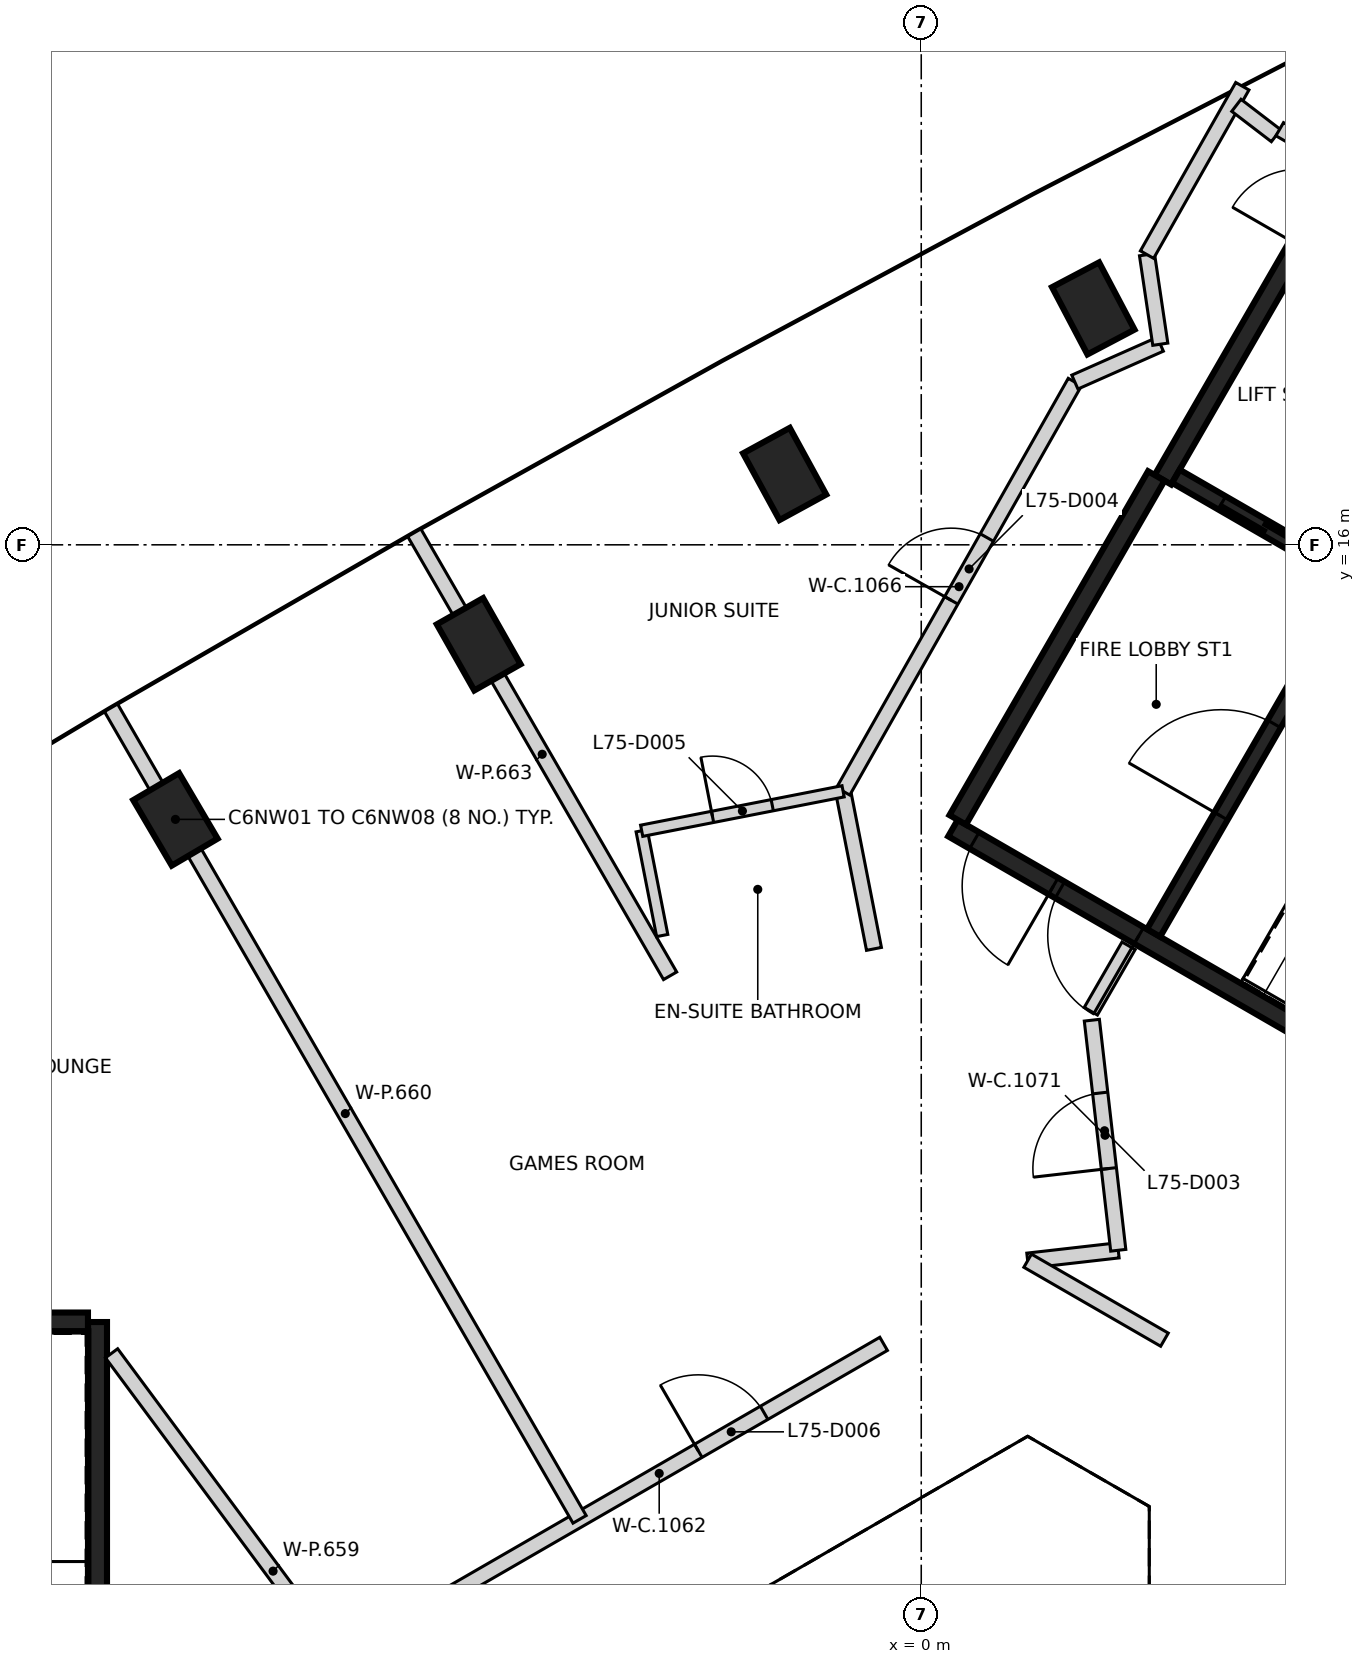
"""IFC4 building model, lengths in metres.
Left out: names, types, materials, properties, quantities, classifications, styles, units other than length and angle.
Written with IfcOpenShell. Run it as: python <this file> out.ifc"""

import sys

from ifc_helpers import new_model, si_unit, direction, frame, frame_2d, origin, origin_2d, place, context, subcontext, project, spatial, rectangle, extrude, element, fill, save


model = new_model("IFC4")
c1 = context("Model", 3, precision=1e-05, world=origin(), true_north=direction((0.0, 1.0)))
c2 = subcontext(c1, "Body", "Model", "MODEL_VIEW")
j1 = project(units=[si_unit("LENGTHUNIT", "METRE"), si_unit("PLANEANGLEUNIT", "RADIAN")], contexts=[c1])
p1 = place(None, origin())
s1 = spatial("IfcSite", under=j1, at=p1, CompositionType="ELEMENT")
p2 = place(p1, origin())
s2 = spatial("IfcBuilding", under=s1, at=p2, CompositionType="ELEMENT")
p3 = place(p2, frame((0.0, 0.0, 298.2)))
s3 = spatial("IfcBuildingStorey", under=s2, at=p3, CompositionType="ELEMENT", Elevation=298.2)
for number, where, z_axis, x_axis in (
    (1, (2.263, 19.11, -0.35), (0.0, 0.0, 1.0), (-0.466, 0.885, 0.0)),
    (2, (-1.797, 16.932, -0.35), (0.0, 0.0, 1.0), (-0.479, 0.878, 0.0)),
    (3, (-5.822, 14.691, -0.35), (0.0, 0.0, 1.0), (-0.493, 0.87, 0.0)),
    (4, (-9.812, 12.388, -0.35), (0.0, 0.0, 1.0), (-0.507, 0.862, 0.0)),
):
    element("IfcColumn", number, at=place(p3, frame(where, z_axis=z_axis, x_axis=x_axis)), inside=s3, PredefinedType="COLUMN", context=c2, shape_type="SweptSolid", body=[
        extrude(rectangle(XDim=1.0, YDim=0.7, at=origin_2d()), origin(), (0.0, 0.0, 1.0), 2.64),
    ])
p4 = place(p3, frame((-10.837, 5.775, 0.0), z_axis=(0.0, 0.0, 1.0), x_axis=(0.0, -1.0, 0.0)))
e5 = element("IfcWall", 5, at=p4, inside=s3, PredefinedType="SHEAR", context=c2, shape_type="SweptSolid", body=[
    extrude(rectangle(XDim=11.55, YDim=0.25, at=frame_2d((5.775, 0.0))), origin(), (0.0, 0.0, 1.0), 3.2),
])
p5 = place(p4, frame((10.025, 0.0, 0.0)))
e6 = element("IfcOpeningElement", 6, at=p5, cuts=e5, PredefinedType="OPENING", context=c2, shape_type="SweptSolid", body=[
    extrude(rectangle(XDim=1.2, YDim=2.1, at=frame_2d((0.6, 1.05))), frame((0.0, 0.135, 0.0), z_axis=(0.0, -1.0, 0.0), x_axis=(1.0, 0.0, 0.0)), (0.0, 0.0, 1.0), 0.27),
])
p6 = place(p4, frame((8.725, 0.0, 0.0)))
e7 = element("IfcOpeningElement", 7, at=p6, cuts=e5, PredefinedType="OPENING", context=c2, shape_type="SweptSolid", body=[
    extrude(rectangle(XDim=1.2, YDim=2.1, at=frame_2d((0.6, 1.05))), frame((0.0, 0.135, 0.0), z_axis=(0.0, -1.0, 0.0), x_axis=(1.0, 0.0, 0.0)), (0.0, 0.0, 1.0), 0.27),
])
p7 = place(p3, frame((-16.472, 5.775, 0.0), z_axis=(0.0, 0.0, 1.0), x_axis=(1.0, 0.0, 0.0)))
e8 = element("IfcWall", 8, at=p7, inside=s3, PredefinedType="SHEAR", context=c2, shape_type="SweptSolid", body=[
    extrude(rectangle(XDim=5.51, YDim=0.25, at=frame_2d((2.755, 0.0))), origin(), (0.0, 0.0, 1.0), 3.2),
])
p8 = place(p3, frame((10.42, 6.498, 0.0), z_axis=(0.0, 0.0, 1.0), x_axis=(-0.866021906294, 0.500006057782, 0.0)))
e9 = element("IfcWall", 9, at=p8, inside=s3, PredefinedType="SHEAR", context=c2, shape_type="SweptSolid", body=[
    extrude(rectangle(XDim=11.55, YDim=0.25, at=frame_2d((5.775, 0.0))), origin(), (0.0, 0.0, 1.0), 3.2),
])
p9 = place(p8, frame((10.025, 0.0, 0.0)))
e10 = element("IfcOpeningElement", 10, at=p9, cuts=e9, PredefinedType="OPENING", context=c2, shape_type="SweptSolid", body=[
    extrude(rectangle(XDim=1.2, YDim=2.1, at=frame_2d((0.6, 1.05))), frame((0.0, 0.135, 0.0), z_axis=(0.0, -1.0, 0.0), x_axis=(1.0, 0.0, 0.0)), (0.0, 0.0, 1.0), 0.27),
])
p10 = place(p8, frame((8.725, 0.0, 0.0)))
e11 = element("IfcOpeningElement", 11, at=p10, cuts=e9, PredefinedType="OPENING", context=c2, shape_type="SweptSolid", body=[
    extrude(rectangle(XDim=1.2, YDim=2.1, at=frame_2d((0.6, 1.05))), frame((0.0, 0.135, 0.0), z_axis=(0.0, -1.0, 0.0), x_axis=(1.0, 0.0, 0.0)), (0.0, 0.0, 1.0), 0.27),
])
p11 = place(p3, frame((3.179, 16.856, 0.0), z_axis=(0.0, 0.0, 1.0), x_axis=(0.500001955336, 0.866024274868, 0.0)))
e12 = element("IfcWall", 12, at=p11, inside=s3, PredefinedType="SHEAR", context=c2, shape_type="SweptSolid", body=[
    extrude(rectangle(XDim=6.125, YDim=0.25, at=frame_2d((3.062, 0.0))), origin(), (0.0, 0.0, 1.0), 3.2),
])
p12 = place(p11, frame((3.563, 0.0, 0.0)))
e13 = element("IfcOpeningElement", 13, at=p12, cuts=e12, PredefinedType="OPENING", context=c2, shape_type="SweptSolid", body=[
    extrude(rectangle(XDim=1.0, YDim=2.1, at=frame_2d((0.5, 1.05))), frame((0.0, 0.135, 0.0), z_axis=(0.0, -1.0, 0.0), x_axis=(1.0, 0.0, 0.0)), (0.0, 0.0, 1.0), 0.27),
])
p13 = place(p3, frame((0.48, 12.381, 0.0), z_axis=(0.0, 0.0, 1.0), x_axis=(0.49999885962, 0.866026062182, 0.0)))
e14 = element("IfcWall", 14, at=p13, inside=s3, PredefinedType="SHEAR", context=c2, shape_type="SweptSolid", body=[
    extrude(rectangle(XDim=5.225, YDim=0.25, at=frame_2d((2.612, 0.0))), origin(), (0.0, 0.0, 1.0), 3.2),
])
p14 = place(p3, frame((3.057, 10.895, 0.0), z_axis=(0.0, 0.0, 1.0), x_axis=(0.500027839223, 0.866009330205, 0.0)))
e15 = element("IfcWall", 15, at=p14, inside=s3, PredefinedType="SHEAR", context=c2, shape_type="SweptSolid", body=[
    extrude(rectangle(XDim=5.098, YDim=0.2, at=frame_2d((2.549, 0.0))), origin(), (0.0, 0.0, 1.0), 3.2),
])
p15 = place(p14, frame((1.774, 0.0, 0.0)))
e16 = element("IfcOpeningElement", 16, at=p15, cuts=e15, PredefinedType="OPENING", context=c2, shape_type="SweptSolid", body=[
    extrude(rectangle(XDim=1.4, YDim=2.1, at=frame_2d((0.7, 1.05))), frame((0.0, 0.11, 0.0), z_axis=(0.0, -1.0, 0.0), x_axis=(1.0, 0.0, 0.0)), (0.0, 0.0, 1.0), 0.22),
])
p16 = place(p3, frame((5.646, 15.576, 0.0), z_axis=(0.0, 0.0, 1.0), x_axis=(-0.866018407898, 0.500012117035, 0.0)))
e17 = element("IfcWall", 17, at=p16, inside=s3, PredefinedType="SHEAR", context=c2, shape_type="SweptSolid", body=[
    extrude(rectangle(XDim=2.651, YDim=0.2, at=frame_2d((1.325, 0.0))), origin(), (0.0, 0.0, 1.0), 3.2),
])
p17 = place(p16, frame((0.652, 0.0, 0.0)))
e18 = element("IfcOpeningElement", 18, at=p17, cuts=e17, PredefinedType="OPENING", context=c2, shape_type="SweptSolid", body=[
    extrude(rectangle(XDim=1.3, YDim=2.1, at=frame_2d((0.65, 1.05))), frame((0.0, 0.11, 0.0), z_axis=(0.0, -1.0, 0.0), x_axis=(1.0, 0.0, 0.0)), (0.0, 0.0, 1.0), 0.22),
])
p18 = place(p3, frame((-6.4, 2.079, 0.0), z_axis=(0.0, 0.0, 1.0), x_axis=(0.866037708501, 0.499978687001, 0.0)))
e19 = element("IfcWall", 19, at=p18, inside=s3, PredefinedType="PARTITIONING", context=c2, shape_type="SweptSolid", body=[
    extrude(rectangle(XDim=6.818, YDim=0.2, at=frame_2d((3.409, 0.0))), origin(), (0.0, 0.0, 1.0), 3.2),
])
p19 = place(p18, frame((4.003, 0.0, 0.0)))
e20 = element("IfcOpeningElement", 20, at=p19, cuts=e19, PredefinedType="OPENING", context=c2, shape_type="SweptSolid", body=[
    extrude(rectangle(XDim=1.0, YDim=2.1, at=frame_2d((0.5, 1.05))), frame((0.0, 0.11, 0.0), z_axis=(0.0, -1.0, 0.0), x_axis=(1.0, 0.0, 0.0)), (0.0, 0.0, 1.0), 0.22),
])
p20 = place(p3, frame((-1.028, 12.757, 0.0), z_axis=(0.0, 0.0, 1.0), x_axis=(0.192202773855, -0.981355233197, 0.0)))
e21 = element("IfcWall", 21, at=p20, inside=s3, PredefinedType="PARTITIONING", context=c2, shape_type="SweptSolid", body=[
    extrude(rectangle(XDim=2.112, YDim=0.2, at=frame_2d((1.056, 0.0))), origin(), (0.0, 0.0, 1.0), 3.2),
])
p21 = place(p3, frame((-1.027, 12.757, 0.0), z_axis=(0.0, 0.0, 1.0), x_axis=(0.492663063759, 0.870220147783, 0.0)))
e22 = element("IfcWall", 22, at=p21, inside=s3, PredefinedType="PARTITIONING", context=c2, shape_type="SweptSolid", body=[
    extrude(rectangle(XDim=6.187, YDim=0.2, at=frame_2d((3.094, 0.0))), origin(), (0.0, 0.0, 1.0), 3.2),
])
p22 = place(p21, frame((2.887, 0.0, 0.0)))
e23 = element("IfcOpeningElement", 23, at=p22, cuts=e22, PredefinedType="OPENING", context=c2, shape_type="SweptSolid", body=[
    extrude(rectangle(XDim=0.95, YDim=2.1, at=frame_2d((0.475, 1.05))), frame((0.0, 0.11, 0.0), z_axis=(0.0, -1.0, 0.0), x_axis=(1.0, 0.0, 0.0)), (0.0, 0.0, 1.0), 0.22),
])
p23 = place(p3, frame((1.4, 6.582, 0.0), z_axis=(0.0, 0.0, 1.0), x_axis=(0.993556915844, 0.11333426216, 0.0)))
e24 = element("IfcWall", 24, at=p23, inside=s3, PredefinedType="PARTITIONING", context=c2, shape_type="SweptSolid", body=[
    extrude(rectangle(XDim=1.2, YDim=0.2, at=frame_2d((0.6, 0.0))), origin(), (0.0, 0.0, 1.0), 3.2),
])
p24 = place(p3, frame((1.4, 6.582, 0.0), z_axis=(0.0, 0.0, 1.0), x_axis=(0.866066271601, -0.499929208183, 0.0)))
e25 = element("IfcWall", 25, at=p24, inside=s3, PredefinedType="PARTITIONING", context=c2, shape_type="SweptSolid", body=[
    extrude(rectangle(XDim=2.078, YDim=0.2, at=frame_2d((1.039, 0.0))), origin(), (0.0, 0.0, 1.0), 3.2),
])
p25 = place(p3, frame((2.021, 18.141, 0.0), z_axis=(0.0, 0.0, 1.0), x_axis=(0.914343087003, 0.404940389748, 0.0)))
e26 = element("IfcWall", 26, at=p25, inside=s3, PredefinedType="PARTITIONING", context=c2, shape_type="SweptSolid", body=[
    extrude(rectangle(XDim=1.229, YDim=0.2, at=frame_2d((0.615, 0.0))), origin(), (0.0, 0.0, 1.0), 3.2),
])
p26 = place(p3, frame((2.592, 6.719, 0.0), z_axis=(0.0, 0.0, 1.0), x_axis=(-0.114027951455, 0.993477541914, 0.0)))
e27 = element("IfcWall", 27, at=p26, inside=s3, PredefinedType="PARTITIONING", context=c2, shape_type="SweptSolid", body=[
    extrude(rectangle(XDim=3.047, YDim=0.2, at=frame_2d((1.523, 0.0))), origin(), (0.0, 0.0, 1.0), 3.2),
])
p27 = place(p26, frame((1.083, 0.0, 0.0)))
e28 = element("IfcOpeningElement", 28, at=p27, cuts=e27, PredefinedType="OPENING", context=c2, shape_type="SweptSolid", body=[
    extrude(rectangle(XDim=1.0, YDim=2.1, at=frame_2d((0.5, 1.05))), frame((0.0, 0.11, 0.0), z_axis=(0.0, -1.0, 0.0), x_axis=(1.0, 0.0, 0.0)), (0.0, 0.0, 1.0), 0.22),
])
p28 = place(p3, frame((2.231, 9.864, 0.0), z_axis=(0.0, 0.0, 1.0), x_axis=(0.499942098031, 0.866058830921, 0.0)))
e29 = element("IfcWall", 29, at=p28, inside=s3, PredefinedType="PARTITIONING", context=c2, shape_type="SweptSolid", body=[
    extrude(rectangle(XDim=0.994, YDim=0.2, at=frame_2d((0.497, 0.0))), origin(), (0.0, 0.0, 1.0), 3.2),
])
p29 = place(p3, frame((2.97, 19.817, 0.0), z_axis=(0.0, 0.0, 1.0), x_axis=(0.146986994932, -0.989138424752, 0.0)))
e30 = element("IfcWall", 30, at=p29, inside=s3, PredefinedType="PARTITIONING", context=c2, shape_type="SweptSolid", body=[
    extrude(rectangle(XDim=1.191, YDim=0.2, at=frame_2d((0.595, 0.0))), origin(), (0.0, 0.0, 1.0), 2.29),
])
p30 = place(p3, frame((2.97, 19.818, 0.0), z_axis=(0.0, 0.0, 1.0), x_axis=(0.492727027301, 0.870183932607, 0.0)))
e31 = element("IfcWall", 31, at=p30, inside=s3, PredefinedType="PARTITIONING", context=c2, shape_type="SweptSolid", body=[
    extrude(rectangle(XDim=2.546, YDim=0.2, at=frame_2d((1.273, 0.0))), origin(), (0.0, 0.0, 1.0), 3.2),
])
p31 = place(p3, frame((4.146, 21.782, 0.0), z_axis=(0.0, 0.0, 1.0), x_axis=(0.793977493121, -0.607947152652, 0.0)))
e32 = element("IfcWall", 32, at=p31, inside=s3, PredefinedType="PARTITIONING", context=c2, shape_type="SweptSolid", body=[
    extrude(rectangle(XDim=0.656, YDim=0.2, at=frame_2d((0.328, 0.0))), origin(), (0.0, 0.0, 1.0), 3.2),
])
p32 = place(p3, frame((4.716, 21.468, 0.0), z_axis=(0.0, 0.0, 1.0), x_axis=(0.865912682783, -0.500195187698, 0.0)))
e33 = element("IfcWall", 33, at=p32, inside=s3, PredefinedType="PARTITIONING", context=c2, shape_type="SweptSolid", body=[
    extrude(rectangle(XDim=0.79, YDim=0.2, at=frame_2d((0.395, 0.0))), origin(), (0.0, 0.0, 1.0), 3.2),
])
p33 = place(p3, frame((-10.652, 5.364, 0.0), z_axis=(0.0, 0.0, 1.0), x_axis=(0.595550732464, -0.803317698711, 0.0)))
e34 = element("IfcWall", 34, at=p33, inside=s3, PredefinedType="PARTITIONING", context=c2, shape_type="SweptSolid", body=[
    extrude(rectangle(XDim=7.135, YDim=0.2, at=frame_2d((3.567, 0.0))), origin(), (0.0, 0.0, 1.0), 3.2),
])
p34 = place(p3, frame((-10.659, 13.856, 0.0), z_axis=(0.0, 0.0, 1.0), x_axis=(0.500004723409, -0.866022676706, 0.0)))
e35 = element("IfcWall", 35, at=p34, inside=s3, PredefinedType="PARTITIONING", context=c2, shape_type="SweptSolid", body=[
    extrude(rectangle(XDim=12.329, YDim=0.2, at=frame_2d((6.164, 0.0))), origin(), (0.0, 0.0, 1.0), 3.2),
])
p35 = place(p3, frame((-6.67, 16.159, 0.0), z_axis=(0.0, 0.0, 1.0), x_axis=(0.50003223478, -0.866006792225, 0.0)))
e36 = element("IfcWall", 36, at=p35, inside=s3, PredefinedType="PARTITIONING", context=c2, shape_type="SweptSolid", body=[
    extrude(rectangle(XDim=6.731, YDim=0.2, at=frame_2d((3.365, 0.0))), origin(), (0.0, 0.0, 1.0), 3.2),
])
p36 = place(p3, frame((-3.678, 12.238, 0.0), z_axis=(0.0, 0.0, 1.0), x_axis=(0.192270029527, -0.981342058482, 0.0)))
e37 = element("IfcWall", 37, at=p36, inside=s3, PredefinedType="PARTITIONING", context=c2, shape_type="SweptSolid", body=[
    extrude(rectangle(XDim=1.404, YDim=0.15, at=frame_2d((0.702, 0.0))), origin(), (0.0, 0.0, 1.0), 3.2),
])
p37 = place(p3, frame((-3.678, 12.238, 0.0), z_axis=(0.0, 0.0, 1.0), x_axis=(0.98135189098, 0.192219837868, 0.0)))
e38 = element("IfcWall", 38, at=p37, inside=s3, PredefinedType="PARTITIONING", context=c2, shape_type="SweptSolid", body=[
    extrude(rectangle(XDim=2.7, YDim=0.15, at=frame_2d((1.35, 0.0))), origin(), (0.0, 0.0, 1.0), 3.2),
])
p38 = place(p37, frame((0.95, 0.0, 0.0)))
e39 = element("IfcOpeningElement", 39, at=p38, cuts=e38, PredefinedType="OPENING", context=c2, shape_type="SweptSolid", body=[
    extrude(rectangle(XDim=0.8, YDim=2.1, at=frame_2d((0.4, 1.05))), frame((0.0, 0.085, 0.0), z_axis=(0.0, -1.0, 0.0), x_axis=(1.0, 0.0, 0.0)), (0.0, 0.0, 1.0), 0.17),
])
p39 = place(p17, origin())
e40 = element("IfcDoor", 40, at=p39, inside=s3, OperationType="SLIDING_TO_LEFT", PredefinedType="DOOR", context=c2, shape_type="SweptSolid", body=[
    extrude(rectangle(XDim=1.3, YDim=2.1, at=frame_2d((0.65, 1.05))), frame((0.0, 0.025, 0.0), z_axis=(0.0, -1.0, 0.0), x_axis=(1.0, 0.0, 0.0)), (0.0, 0.0, 1.0), 0.05),
])
fill(e18, e40)
p40 = place(p9, origin())
e41 = element("IfcDoor", 41, at=p40, inside=s3, OperationType="SINGLE_SWING_LEFT", PredefinedType="DOOR", context=c2, shape_type="SweptSolid", body=[
    extrude(rectangle(XDim=1.2, YDim=2.1, at=frame_2d((0.6, 1.05))), frame((0.0, 0.025, 0.0), z_axis=(0.0, -1.0, 0.0), x_axis=(1.0, 0.0, 0.0)), (0.0, 0.0, 1.0), 0.05),
])
fill(e10, e41)
p41 = place(p10, origin())
e42 = element("IfcDoor", 42, at=p41, inside=s3, OperationType="SINGLE_SWING_RIGHT", PredefinedType="DOOR", context=c2, shape_type="SweptSolid", body=[
    extrude(rectangle(XDim=1.2, YDim=2.1, at=frame_2d((0.6, 1.05))), frame((0.0, 0.025, 0.0), z_axis=(0.0, -1.0, 0.0), x_axis=(1.0, 0.0, 0.0)), (0.0, 0.0, 1.0), 0.05),
])
fill(e11, e42)
p42 = place(p15, origin())
e43 = element("IfcDoor", 43, at=p42, inside=s3, OperationType="SINGLE_SWING_LEFT", PredefinedType="DOOR", context=c2, shape_type="SweptSolid", body=[
    extrude(rectangle(XDim=1.4, YDim=2.1, at=frame_2d((0.7, 1.05))), frame((0.0, 0.025, 0.0), z_axis=(0.0, -1.0, 0.0), x_axis=(1.0, 0.0, 0.0)), (0.0, 0.0, 1.0), 0.05),
])
fill(e16, e43)
p43 = place(p27, origin())
e44 = element("IfcDoor", 44, at=p43, inside=s3, OperationType="SINGLE_SWING_LEFT", PredefinedType="DOOR", context=c2, shape_type="SweptSolid", body=[
    extrude(rectangle(XDim=1.0, YDim=2.1, at=frame_2d((0.5, 1.05))), frame((0.0, 0.025, 0.0), z_axis=(0.0, -1.0, 0.0), x_axis=(1.0, 0.0, 0.0)), (0.0, 0.0, 1.0), 0.05),
])
fill(e28, e44)
p44 = place(p22, origin())
e45 = element("IfcDoor", 45, at=p44, inside=s3, OperationType="SINGLE_SWING_LEFT", PredefinedType="DOOR", context=c2, shape_type="SweptSolid", body=[
    extrude(rectangle(XDim=0.95, YDim=2.1, at=frame_2d((0.475, 1.05))), frame((0.0, 0.025, 0.0), z_axis=(0.0, -1.0, 0.0), x_axis=(1.0, 0.0, 0.0)), (0.0, 0.0, 1.0), 0.05),
])
fill(e23, e45)
p45 = place(p38, origin())
e46 = element("IfcDoor", 46, at=p45, inside=s3, OperationType="SINGLE_SWING_LEFT", PredefinedType="DOOR", context=c2, shape_type="SweptSolid", body=[
    extrude(rectangle(XDim=0.8, YDim=2.1, at=frame_2d((0.4, 1.05))), frame((0.0, 0.025, 0.0), z_axis=(0.0, -1.0, 0.0), x_axis=(1.0, 0.0, 0.0)), (0.0, 0.0, 1.0), 0.05),
])
fill(e39, e46)
p46 = place(p19, origin())
e47 = element("IfcDoor", 47, at=p46, inside=s3, OperationType="SINGLE_SWING_LEFT", PredefinedType="DOOR", context=c2, shape_type="SweptSolid", body=[
    extrude(rectangle(XDim=1.0, YDim=2.1, at=frame_2d((0.5, 1.05))), frame((0.0, 0.025, 0.0), z_axis=(0.0, -1.0, 0.0), x_axis=(1.0, 0.0, 0.0)), (0.0, 0.0, 1.0), 0.05),
])
fill(e20, e47)
save(model, sys.argv[1])
